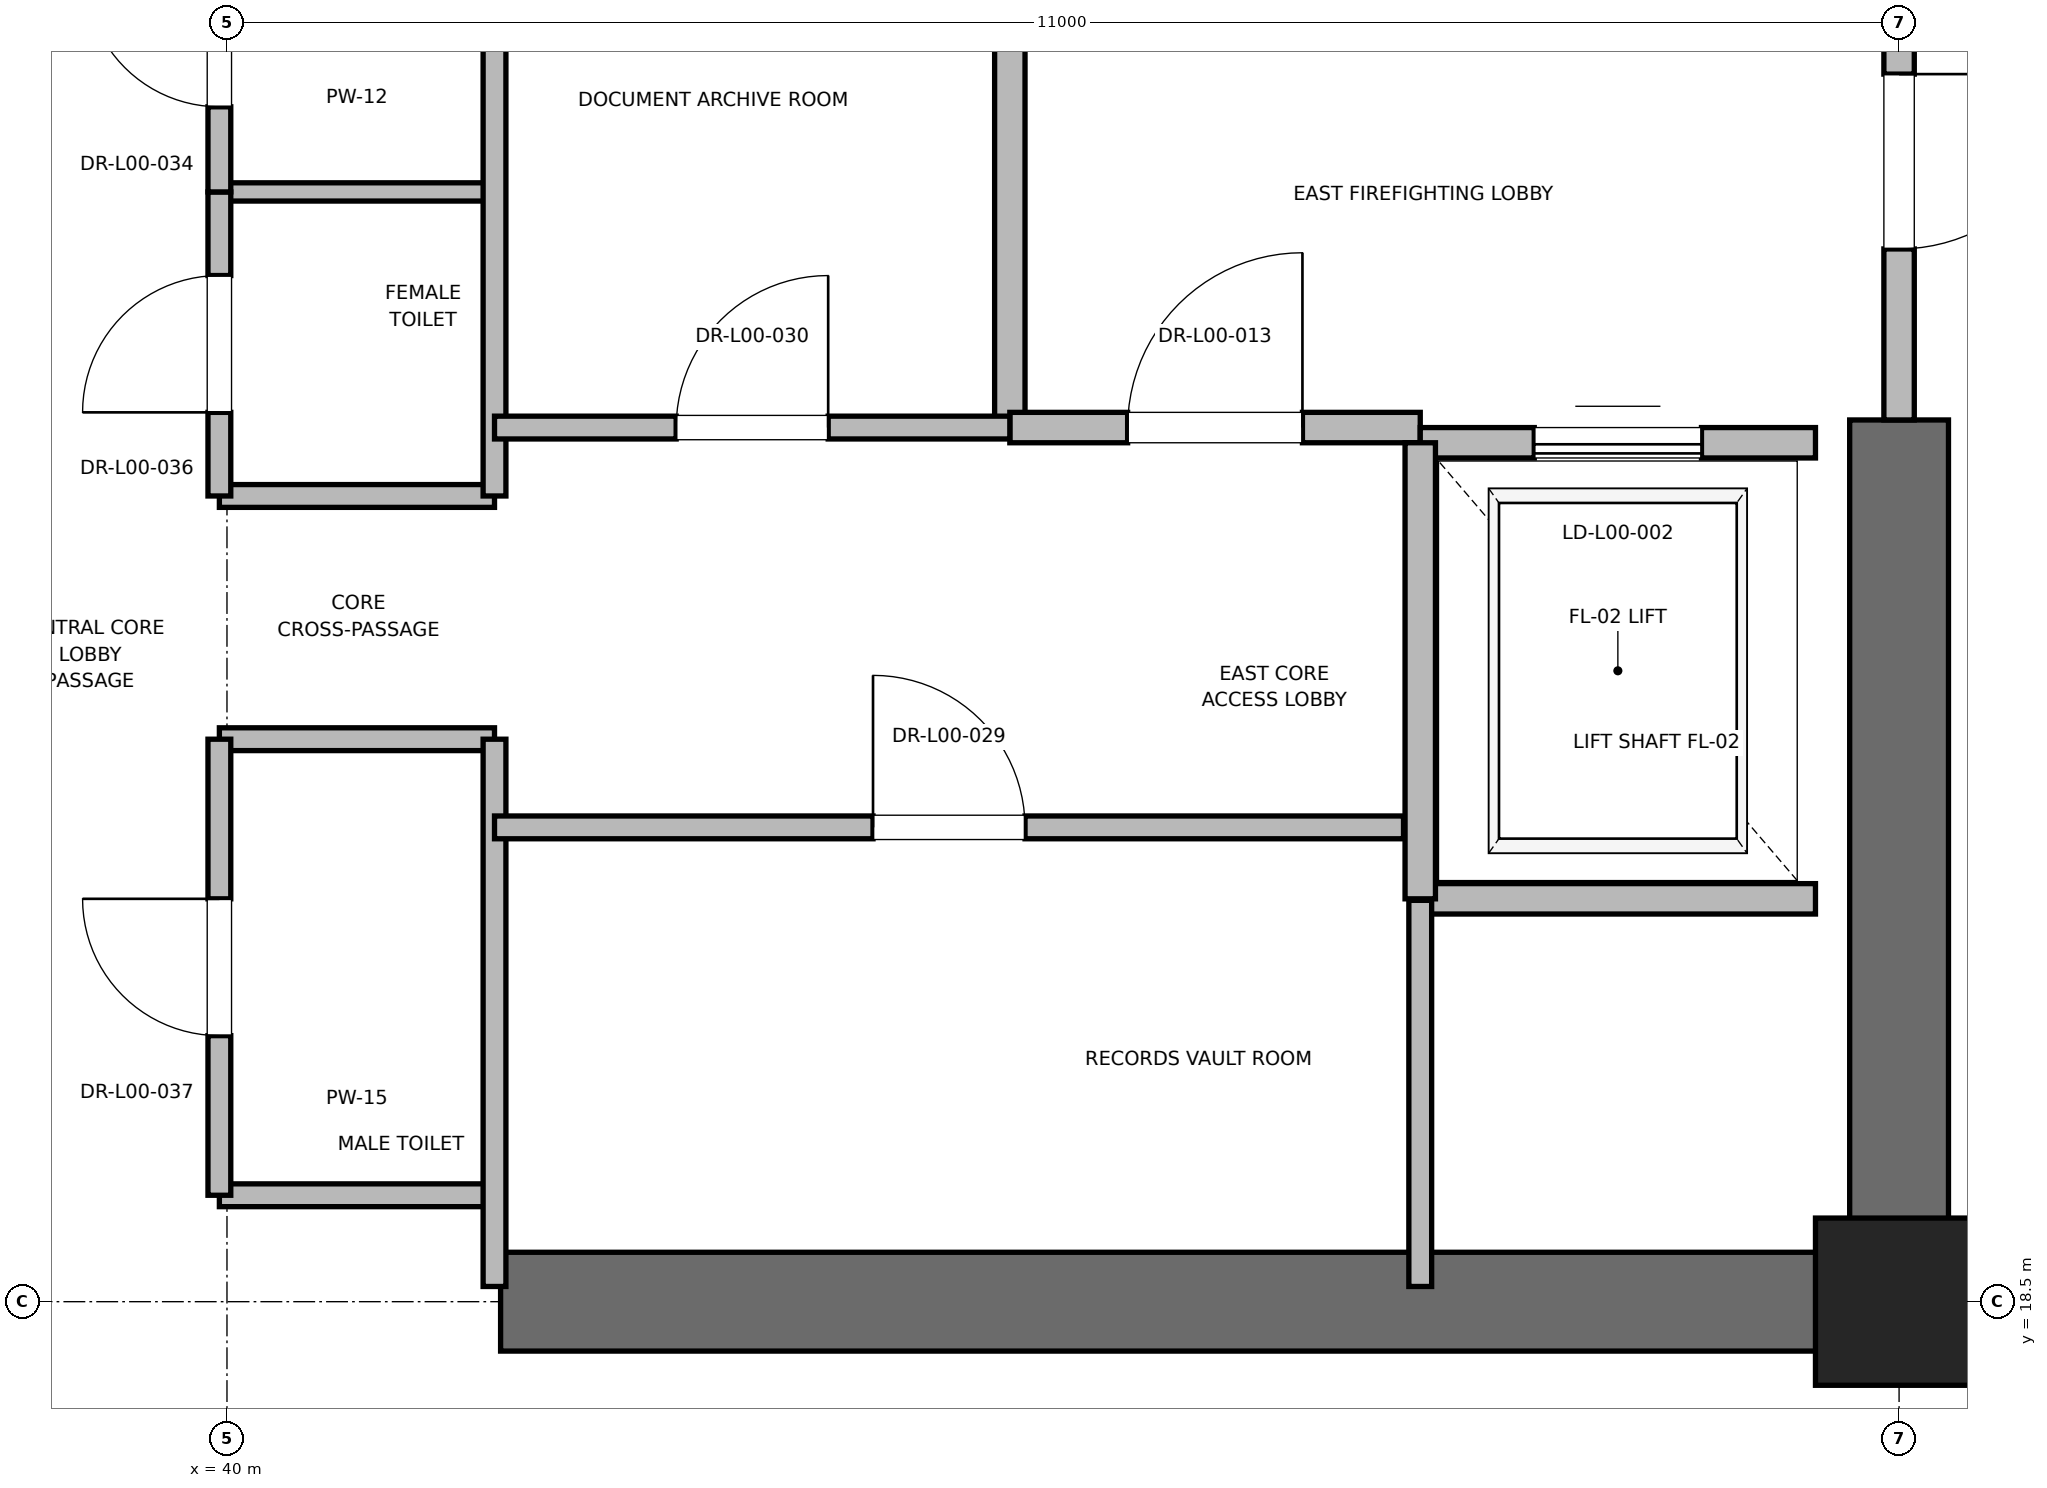
"""IFC4 building model, lengths in metres.
Left out: names, types, materials, properties, quantities, classifications, styles, units other than length and angle.
Written with IfcOpenShell. Run it as: python <this file> out.ifc"""

import sys

from ifc_helpers import new_model, si_unit, direction, frame, frame_2d, origin, origin_2d, place, context, subcontext, project, spatial, rectangle, extrude, element, fill, save


model = new_model("IFC4")
c1 = context("Model", 3, precision=1e-05, world=origin(), true_north=direction((0.0, 1.0)))
c2 = subcontext(c1, "Body", "Model", "MODEL_VIEW")
j1 = project(units=[si_unit("LENGTHUNIT", "METRE"), si_unit("PLANEANGLEUNIT", "RADIAN")], contexts=[c1])
p1 = place(None, origin())
s1 = spatial("IfcSite", under=j1, at=p1, CompositionType="ELEMENT")
p2 = place(p1, origin())
s2 = spatial("IfcBuilding", under=s1, at=p2, CompositionType="ELEMENT")
p3 = place(p2, origin())
s3 = spatial("IfcBuildingStorey", under=s2, at=p3, CompositionType="ELEMENT", Elevation=0.0)
p4 = place(p3, frame((51.0, 18.5, 0.0), z_axis=(0.0, 0.0, 1.0), x_axis=(1.0, 0.0, 0.0)))
e1 = element("IfcColumn", 1, at=p4, inside=s3, PredefinedType="PILASTER", context=c2, shape_type="SweptSolid", body=[
    extrude(rectangle(XDim=1.1, YDim=1.1, at=origin_2d()), origin(), (0.0, 0.0, 1.0), 6.0),
])
p5 = place(p3, frame((41.8, 18.5, 0.0), z_axis=(0.0, 0.0, 1.0), x_axis=(1.0, 0.0, 0.0)))
e2 = element("IfcWall", 2, at=p5, inside=s3, PredefinedType="SHEAR", context=c2, shape_type="SweptSolid", body=[
    extrude(rectangle(XDim=9.2, YDim=0.65, at=frame_2d((4.6, 0.0))), origin(), (0.0, 0.0, 1.0), 5.72),
])
p6 = place(p3, frame((51.0, 18.5, 0.0), z_axis=(0.0, 0.0, 1.0), x_axis=(0.0, 1.0, 0.0)))
e3 = element("IfcWall", 3, at=p6, inside=s3, PredefinedType="SHEAR", context=c2, shape_type="SweptSolid", body=[
    extrude(rectangle(XDim=5.8, YDim=0.65, at=frame_2d((2.9, 0.0))), origin(), (0.0, 0.0, 1.0), 5.72),
])
p7 = place(p3, frame((45.15, 24.25, 0.0), z_axis=(0.0, 0.0, 1.0), x_axis=(0.0, 1.0, 0.0)))
e4 = element("IfcWall", 4, at=p7, inside=s3, PredefinedType="PARTITIONING", context=c2, shape_type="SweptSolid", body=[
    extrude(rectangle(XDim=3.37, YDim=0.2, at=frame_2d((1.685, 0.0))), origin(), (0.0, 0.0, 1.0), 5.72),
])
p8 = place(p3, frame((45.15, 24.25, 0.0), z_axis=(0.0, 0.0, 1.0), x_axis=(1.0, 0.0, 0.0)))
e5 = element("IfcWall", 5, at=p8, inside=s3, PredefinedType="PARTITIONING", context=c2, shape_type="SweptSolid", body=[
    extrude(rectangle(XDim=2.7, YDim=0.2, at=frame_2d((1.35, 0.0))), origin(), (0.0, 0.0, 1.0), 5.72),
])
p9 = place(p8, frame((0.775, 0.0, 0.0)))
e6 = element("IfcOpeningElement", 6, at=p9, cuts=e5, PredefinedType="OPENING", context=c2, shape_type="SweptSolid", body=[
    extrude(rectangle(XDim=1.15, YDim=2.2, at=frame_2d((0.575, 1.1))), frame((0.0, 0.1, 0.0), z_axis=(0.0, -1.0, 0.0), x_axis=(1.0, 0.0, 0.0)), (0.0, 0.0, 1.0), 0.2),
])
p10 = place(p3, frame((51.0, 27.7, 0.0), z_axis=(0.0, 0.0, 1.0), x_axis=(0.0, -1.0, 0.0)))
e7 = element("IfcWall", 7, at=p10, inside=s3, PredefinedType="PARTITIONING", context=c2, shape_type="SweptSolid", body=[
    extrude(rectangle(XDim=3.4, YDim=0.2, at=frame_2d((1.7, 0.0))), origin(), (0.0, 0.0, 1.0), 4.5),
])
p11 = place(p10, frame((1.125, 0.0, 0.0)))
e8 = element("IfcOpeningElement", 8, at=p11, cuts=e7, PredefinedType="OPENING", context=c2, shape_type="SweptSolid", body=[
    extrude(rectangle(XDim=1.15, YDim=2.2, at=frame_2d((0.575, 1.1))), frame((0.0, 0.1, 0.0), z_axis=(0.0, -1.0, 0.0), x_axis=(1.0, 0.0, 0.0)), (0.0, 0.0, 1.0), 0.2),
])
p12 = place(p3, frame((47.85, 21.15, 0.0), z_axis=(0.0, 0.0, 1.0), x_axis=(1.0, 0.0, 0.0)))
e9 = element("IfcWall", 9, at=p12, inside=s3, PredefinedType="SOLIDWALL", context=c2, shape_type="SweptSolid", body=[
    extrude(rectangle(XDim=2.6, YDim=0.2, at=frame_2d((1.3, 0.0))), origin(), (0.0, 0.0, 1.0), 5.72),
])
p13 = place(p3, frame((50.45, 24.15, 0.0), z_axis=(0.0, 0.0, 1.0), x_axis=(-1.0, 0.0, 0.0)))
e10 = element("IfcWall", 10, at=p13, inside=s3, PredefinedType="SOLIDWALL", context=c2, shape_type="SweptSolid", body=[
    extrude(rectangle(XDim=2.6, YDim=0.2, at=frame_2d((1.3, 0.0))), origin(), (0.0, 0.0, 1.0), 4.5),
])
p14 = place(p13, frame((0.75, 0.0, 0.0)))
e11 = element("IfcOpeningElement", 11, at=p14, cuts=e10, PredefinedType="OPENING", context=c2, shape_type="SweptSolid", body=[
    extrude(rectangle(XDim=1.1, YDim=2.2, at=frame_2d((0.55, 1.1))), frame((0.0, 0.1, 0.0), z_axis=(0.0, -1.0, 0.0), x_axis=(1.0, 0.0, 0.0)), (0.0, 0.0, 1.0), 0.2),
])
p15 = place(p3, frame((47.85, 24.15, 0.0), z_axis=(0.0, 0.0, 1.0), x_axis=(0.0, -1.0, 0.0)))
e12 = element("IfcWall", 12, at=p15, inside=s3, PredefinedType="SOLIDWALL", context=c2, shape_type="SweptSolid", body=[
    extrude(rectangle(XDim=3.0, YDim=0.2, at=frame_2d((1.5, 0.0))), origin(), (0.0, 0.0, 1.0), 5.72),
])
for number, where, z_axis, x_axis in (
    (13, (39.95, 19.2, 0.0), (0.0, 0.0, 1.0), (1.0, 0.0, 0.0)),
    (14, (39.95, 22.2, 0.0), (0.0, 0.0, 1.0), (1.0, 0.0, 0.0)),
    (15, (39.95, 23.8, 0.0), (0.0, 0.0, 1.0), (1.0, 0.0, 0.0)),
):
    element("IfcWall", number, at=place(p3, frame(where, z_axis=z_axis, x_axis=x_axis)), inside=s3, PredefinedType="PARTITIONING", context=c2, shape_type="SweptSolid", body=[
        extrude(rectangle(XDim=1.81, YDim=0.15, at=frame_2d((0.905, 0.0))), origin(), (0.0, 0.0, 1.0), 2.85),
    ])
p16 = place(p3, frame((39.95, 25.8, 0.0), z_axis=(0.0, 0.0, 1.0), x_axis=(1.0, 0.0, 0.0)))
e16 = element("IfcWall", 16, at=p16, inside=s3, PredefinedType="PARTITIONING", context=c2, shape_type="SweptSolid", body=[
    extrude(rectangle(XDim=1.81, YDim=0.12, at=frame_2d((0.905, 0.0))), origin(), (0.0, 0.0, 1.0), 2.85),
])
p17 = place(p3, frame((41.76, 18.6, 0.0), z_axis=(0.0, 0.0, 1.0), x_axis=(0.0, 1.0, 0.0)))
e17 = element("IfcWall", 17, at=p17, inside=s3, PredefinedType="PARTITIONING", context=c2, shape_type="SweptSolid", body=[
    extrude(rectangle(XDim=3.6, YDim=0.15, at=frame_2d((1.8, 0.0))), origin(), (0.0, 0.0, 1.0), 2.85),
])
p18 = place(p3, frame((41.76, 23.8, 0.0), z_axis=(0.0, 0.0, 1.0), x_axis=(0.0, 1.0, 0.0)))
e18 = element("IfcWall", 18, at=p18, inside=s3, PredefinedType="PARTITIONING", context=c2, shape_type="SweptSolid", body=[
    extrude(rectangle(XDim=4.0, YDim=0.15, at=frame_2d((2.0, 0.0))), origin(), (0.0, 0.0, 1.0), 2.85),
])
p19 = place(p3, frame((39.95, 19.2, 0.0), z_axis=(0.0, 0.0, 1.0), x_axis=(0.0, 1.0, 0.0)))
e19 = element("IfcWall", 19, at=p19, inside=s3, PredefinedType="PARTITIONING", context=c2, shape_type="SweptSolid", body=[
    extrude(rectangle(XDim=3.0, YDim=0.15, at=frame_2d((1.5, 0.0))), origin(), (0.0, 0.0, 1.0), 2.85),
])
p20 = place(p19, frame((1.05, 0.0, 0.0)))
e20 = element("IfcOpeningElement", 20, at=p20, cuts=e19, PredefinedType="OPENING", context=c2, shape_type="SweptSolid", body=[
    extrude(rectangle(XDim=0.9, YDim=2.1, at=frame_2d((0.45, 1.05))), frame((0.0, 0.075, 0.0), z_axis=(0.0, -1.0, 0.0), x_axis=(1.0, 0.0, 0.0)), (0.0, 0.0, 1.0), 0.15),
])
p21 = place(p3, frame((39.95, 23.8, 0.0), z_axis=(0.0, 0.0, 1.0), x_axis=(0.0, 1.0, 0.0)))
e21 = element("IfcWall", 21, at=p21, inside=s3, PredefinedType="PARTITIONING", context=c2, shape_type="SweptSolid", body=[
    extrude(rectangle(XDim=2.0, YDim=0.15, at=frame_2d((1.0, 0.0))), origin(), (0.0, 0.0, 1.0), 2.85),
])
p22 = place(p21, frame((0.55, 0.0, 0.0)))
e22 = element("IfcOpeningElement", 22, at=p22, cuts=e21, PredefinedType="OPENING", context=c2, shape_type="SweptSolid", body=[
    extrude(rectangle(XDim=0.9, YDim=2.1, at=frame_2d((0.45, 1.05))), frame((0.0, 0.075, 0.0), z_axis=(0.0, -1.0, 0.0), x_axis=(1.0, 0.0, 0.0)), (0.0, 0.0, 1.0), 0.15),
])
p23 = place(p3, frame((39.95, 25.8, 0.0), z_axis=(0.0, 0.0, 1.0), x_axis=(0.0, 1.0, 0.0)))
e23 = element("IfcWall", 23, at=p23, inside=s3, PredefinedType="PARTITIONING", context=c2, shape_type="SweptSolid", body=[
    extrude(rectangle(XDim=2.0, YDim=0.15, at=frame_2d((1.0, 0.0))), origin(), (0.0, 0.0, 1.0), 2.85),
])
p24 = place(p23, frame((0.56, 0.0, 0.0)))
e24 = element("IfcOpeningElement", 24, at=p24, cuts=e23, PredefinedType="OPENING", context=c2, shape_type="SweptSolid", body=[
    extrude(rectangle(XDim=0.88, YDim=2.1, at=frame_2d((0.44, 1.05))), frame((0.0, 0.075, 0.0), z_axis=(0.0, -1.0, 0.0), x_axis=(1.0, 0.0, 0.0)), (0.0, 0.0, 1.0), 0.15),
])
p25 = place(p3, frame((47.85, 18.6, 0.0), z_axis=(0.0, 0.0, 1.0), x_axis=(0.0, 1.0, 0.0)))
e25 = element("IfcWall", 25, at=p25, inside=s3, PredefinedType="PARTITIONING", context=c2, shape_type="SweptSolid", body=[
    extrude(rectangle(XDim=2.54, YDim=0.15, at=frame_2d((1.27, 0.0))), origin(), (0.0, 0.0, 1.0), 2.85),
])
p26 = place(p3, frame((41.76, 21.62, 0.0), z_axis=(0.0, 0.0, 1.0), x_axis=(1.0, 0.0, 0.0)))
e26 = element("IfcWall", 26, at=p26, inside=s3, PredefinedType="PARTITIONING", context=c2, shape_type="SweptSolid", body=[
    extrude(rectangle(XDim=5.98, YDim=0.15, at=frame_2d((2.99, 0.0))), origin(), (0.0, 0.0, 1.0), 2.85),
])
p27 = place(p26, frame((2.49, 0.0, 0.0)))
e27 = element("IfcOpeningElement", 27, at=p27, cuts=e26, PredefinedType="OPENING", context=c2, shape_type="SweptSolid", body=[
    extrude(rectangle(XDim=1.0, YDim=2.15, at=frame_2d((0.5, 1.075))), frame((0.0, 0.075, 0.0), z_axis=(0.0, -1.0, 0.0), x_axis=(1.0, 0.0, 0.0)), (0.0, 0.0, 1.0), 0.15),
])
p28 = place(p3, frame((41.76, 24.25, 0.0), z_axis=(0.0, 0.0, 1.0), x_axis=(1.0, 0.0, 0.0)))
e28 = element("IfcWall", 28, at=p28, inside=s3, PredefinedType="PARTITIONING", context=c2, shape_type="SweptSolid", body=[
    extrude(rectangle(XDim=3.39, YDim=0.15, at=frame_2d((1.695, 0.0))), origin(), (0.0, 0.0, 1.0), 2.85),
])
p29 = place(p28, frame((1.195, 0.0, 0.0)))
e29 = element("IfcOpeningElement", 29, at=p29, cuts=e28, PredefinedType="OPENING", context=c2, shape_type="SweptSolid", body=[
    extrude(rectangle(XDim=1.0, YDim=2.15, at=frame_2d((0.5, 1.075))), frame((0.0, 0.075, 0.0), z_axis=(0.0, -1.0, 0.0), x_axis=(1.0, 0.0, 0.0)), (0.0, 0.0, 1.0), 0.15),
])
p30 = place(p9, origin())
e30 = element("IfcDoor", 30, at=p30, inside=s3, OperationType="SINGLE_SWING_RIGHT", PredefinedType="DOOR", context=c2, shape_type="SweptSolid", body=[
    extrude(rectangle(XDim=1.15, YDim=2.2, at=frame_2d((0.575, 1.1))), frame((0.0, 0.025, 0.0), z_axis=(0.0, -1.0, 0.0), x_axis=(1.0, 0.0, 0.0)), (0.0, 0.0, 1.0), 0.05),
])
fill(e6, e30)
p31 = place(p11, origin())
e31 = element("IfcDoor", 31, at=p31, inside=s3, OperationType="SINGLE_SWING_LEFT", PredefinedType="DOOR", context=c2, shape_type="SweptSolid", body=[
    extrude(rectangle(XDim=1.15, YDim=2.2, at=frame_2d((0.575, 1.1))), frame((0.0, 0.025, 0.0), z_axis=(0.0, -1.0, 0.0), x_axis=(1.0, 0.0, 0.0)), (0.0, 0.0, 1.0), 0.05),
])
fill(e8, e31)
p32 = place(p14, origin())
e32 = element("IfcDoor", 32, at=p32, inside=s3, OperationType="SLIDING_TO_RIGHT", PredefinedType="DOOR", context=c2, shape_type="SweptSolid", body=[
    extrude(rectangle(XDim=1.1, YDim=2.2, at=frame_2d((0.55, 1.1))), frame((0.0, 0.025, 0.0), z_axis=(0.0, -1.0, 0.0), x_axis=(1.0, 0.0, 0.0)), (0.0, 0.0, 1.0), 0.05),
])
fill(e11, e32)
p33 = place(p20, origin())
e33 = element("IfcDoor", 33, at=p33, inside=s3, OperationType="SINGLE_SWING_RIGHT", PredefinedType="DOOR", context=c2, shape_type="SweptSolid", body=[
    extrude(rectangle(XDim=0.9, YDim=2.1, at=frame_2d((0.45, 1.05))), frame((0.0, 0.025, 0.0), z_axis=(0.0, -1.0, 0.0), x_axis=(1.0, 0.0, 0.0)), (0.0, 0.0, 1.0), 0.05),
])
fill(e20, e33)
p34 = place(p22, origin())
e34 = element("IfcDoor", 34, at=p34, inside=s3, OperationType="SINGLE_SWING_LEFT", PredefinedType="DOOR", context=c2, shape_type="SweptSolid", body=[
    extrude(rectangle(XDim=0.9, YDim=2.1, at=frame_2d((0.45, 1.05))), frame((0.0, 0.025, 0.0), z_axis=(0.0, -1.0, 0.0), x_axis=(1.0, 0.0, 0.0)), (0.0, 0.0, 1.0), 0.05),
])
fill(e22, e34)
p35 = place(p24, origin())
e35 = element("IfcDoor", 35, at=p35, inside=s3, OperationType="SINGLE_SWING_RIGHT", PredefinedType="DOOR", context=c2, shape_type="SweptSolid", body=[
    extrude(rectangle(XDim=0.88, YDim=2.1, at=frame_2d((0.44, 1.05))), frame((0.0, 0.025, 0.0), z_axis=(0.0, -1.0, 0.0), x_axis=(1.0, 0.0, 0.0)), (0.0, 0.0, 1.0), 0.05),
])
fill(e24, e35)
p36 = place(p27, origin())
e36 = element("IfcDoor", 36, at=p36, inside=s3, OperationType="SINGLE_SWING_LEFT", PredefinedType="DOOR", context=c2, shape_type="SweptSolid", body=[
    extrude(rectangle(XDim=1.0, YDim=2.15, at=frame_2d((0.5, 1.075))), frame((0.0, 0.025, 0.0), z_axis=(0.0, -1.0, 0.0), x_axis=(1.0, 0.0, 0.0)), (0.0, 0.0, 1.0), 0.05),
])
fill(e27, e36)
p37 = place(p29, origin())
e37 = element("IfcDoor", 37, at=p37, inside=s3, OperationType="SINGLE_SWING_RIGHT", PredefinedType="DOOR", context=c2, shape_type="SweptSolid", body=[
    extrude(rectangle(XDim=1.0, YDim=2.15, at=frame_2d((0.5, 1.075))), frame((0.0, 0.025, 0.0), z_axis=(0.0, -1.0, 0.0), x_axis=(1.0, 0.0, 0.0)), (0.0, 0.0, 1.0), 0.05),
])
fill(e29, e37)
save(model, sys.argv[1])
